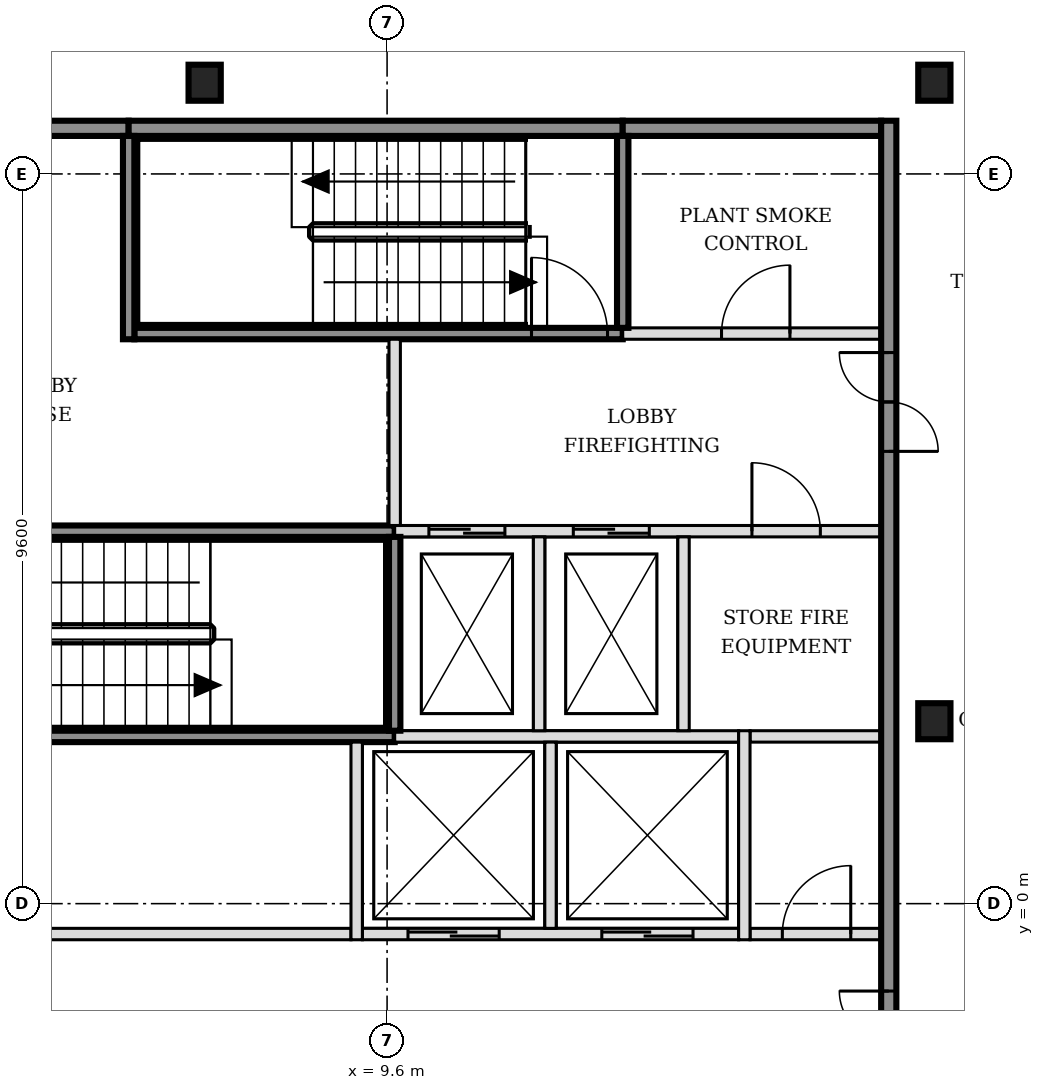
"""IFC4 building model, lengths in metres.
Left out: names, types, materials, properties, quantities, classifications, styles, units other than length and angle.
Written with IfcOpenShell. Run it as: python <this file> out.ifc"""

import sys

from ifc_helpers import new_model, si_unit, direction, frame, frame_2d, origin, origin_2d, place, context, subcontext, project, spatial, rectangle, i_section, extrude, element, fill, save


model = new_model("IFC4")
c1 = context("Model", 3, precision=1e-05, world=origin(), true_north=direction((0.0, 1.0)))
c2 = subcontext(c1, "Body", "Model", "MODEL_VIEW")
j1 = project(units=[si_unit("LENGTHUNIT", "METRE"), si_unit("PLANEANGLEUNIT", "RADIAN")], contexts=[c1])
p1 = place(None, origin())
s1 = spatial("IfcSite", under=j1, at=p1, CompositionType="ELEMENT")
p2 = place(p1, origin())
s2 = spatial("IfcBuilding", under=s1, at=p2, CompositionType="ELEMENT")
p3 = place(p2, frame((0.0, 0.0, 147.0)))
s3 = spatial("IfcBuildingStorey", under=s2, at=p3, CompositionType="ELEMENT", Elevation=147.0)
for number, where, z_axis, x_axis in (
    (1, (16.8, 2.4, -0.15), (0.0, 0.0, 1.0), (1.0, 0.0, 0.0)),
    (2, (7.2, 10.8, -0.15), (0.0, 0.0, 1.0), (1.0, 0.0, 0.0)),
    (3, (16.8, 10.8, -0.15), (0.0, 0.0, 1.0), (1.0, 0.0, 0.0)),
):
    element("IfcColumn", number, at=place(p3, frame(where, z_axis=z_axis, x_axis=x_axis)), inside=s3, PredefinedType="COLUMN", context=c2, shape_type="SweptSolid", body=[
        extrude(i_section(OverallWidth=0.424, OverallDepth=0.474, WebThickness=0.048, FlangeThickness=0.077, FilletRadius=0.015, at=origin_2d()), origin(), (0.0, 0.0, 1.0), 3.6),
    ])
p4 = place(p3, frame((-1.7, -0.4, 0.0), z_axis=(0.0, 0.0, 1.0), x_axis=(1.0, 0.0, 0.0)))
e4 = element("IfcWall", 4, at=p4, inside=s3, PredefinedType="PARTITIONING", context=c2, shape_type="SweptSolid", body=[
    extrude(rectangle(XDim=10.825, YDim=0.15, at=frame_2d((5.413, 0.0))), origin(), (0.0, 0.0, 1.0), 3.45),
])
p5 = place(p4, frame((4.95, 0.0, 0.0)))
e5 = element("IfcOpeningElement", 5, at=p5, cuts=e4, PredefinedType="OPENING", context=c2, shape_type="SweptSolid", body=[
    extrude(rectangle(XDim=0.9, YDim=2.1, at=frame_2d((0.45, 1.05))), frame((0.0, 0.085, 0.0), z_axis=(0.0, -1.0, 0.0), x_axis=(1.0, 0.0, 0.0)), (0.0, 0.0, 1.0), 0.17),
])
p6 = place(p3, frame((9.275, -0.4, 0.0), z_axis=(0.0, 0.0, 1.0), x_axis=(1.0, 0.0, 0.0)))
e6 = element("IfcWall", 6, at=p6, inside=s3, PredefinedType="SOLIDWALL", context=c2, shape_type="SweptSolid", body=[
    extrude(rectangle(XDim=4.95, YDim=0.15, at=frame_2d((2.475, 0.0))), origin(), (0.0, 0.0, 1.0), 3.45),
])
p7 = place(p6, frame((0.6, 0.0, 0.0)))
e7 = element("IfcOpeningElement", 7, at=p7, cuts=e6, PredefinedType="OPENING", context=c2, shape_type="SweptSolid", body=[
    extrude(rectangle(XDim=1.2, YDim=2.1, at=frame_2d((0.6, 1.05))), frame((0.0, 0.085, 0.0), z_axis=(0.0, -1.0, 0.0), x_axis=(1.0, 0.0, 0.0)), (0.0, 0.0, 1.0), 0.17),
])
p8 = place(p6, frame((3.15, 0.0, 0.0)))
e8 = element("IfcOpeningElement", 8, at=p8, cuts=e6, PredefinedType="OPENING", context=c2, shape_type="SweptSolid", body=[
    extrude(rectangle(XDim=1.2, YDim=2.1, at=frame_2d((0.6, 1.05))), frame((0.0, 0.085, 0.0), z_axis=(0.0, -1.0, 0.0), x_axis=(1.0, 0.0, 0.0)), (0.0, 0.0, 1.0), 0.17),
])
p9 = place(p3, frame((14.375, -0.4, 0.0), z_axis=(0.0, 0.0, 1.0), x_axis=(1.0, 0.0, 0.0)))
e9 = element("IfcWall", 9, at=p9, inside=s3, PredefinedType="PARTITIONING", context=c2, shape_type="SweptSolid", body=[
    extrude(rectangle(XDim=1.725, YDim=0.15, at=frame_2d((0.863, 0.0))), origin(), (0.0, 0.0, 1.0), 3.45),
])
p10 = place(p9, frame((0.425, 0.0, 0.0)))
e10 = element("IfcOpeningElement", 10, at=p10, cuts=e9, PredefinedType="OPENING", context=c2, shape_type="SweptSolid", body=[
    extrude(rectangle(XDim=0.9, YDim=2.1, at=frame_2d((0.45, 1.05))), frame((0.0, 0.085, 0.0), z_axis=(0.0, -1.0, 0.0), x_axis=(1.0, 0.0, 0.0)), (0.0, 0.0, 1.0), 0.17),
])
p11 = place(p3, frame((3.2, 2.2, 0.0), z_axis=(0.0, 0.0, 1.0), x_axis=(1.0, 0.0, 0.0)))
e11 = element("IfcWall", 11, at=p11, inside=s3, PredefinedType="SOLIDWALL", context=c2, shape_type="SweptSolid", body=[
    extrude(rectangle(XDim=6.5, YDim=0.15, at=frame_2d((3.25, 0.0))), origin(), (0.0, 0.0, 1.0), 3.45),
])
p12 = place(p3, frame((9.7, 2.2, 0.0), z_axis=(0.0, 0.0, 1.0), x_axis=(1.0, 0.0, 0.0)))
e12 = element("IfcWall", 12, at=p12, inside=s3, PredefinedType="SOLIDWALL", context=c2, shape_type="SweptSolid", body=[
    extrude(rectangle(XDim=4.525, YDim=0.15, at=frame_2d((2.263, 0.0))), origin(), (0.0, 0.0, 1.0), 3.45),
])
p13 = place(p3, frame((14.375, 2.2, 0.0), z_axis=(0.0, 0.0, 1.0), x_axis=(1.0, 0.0, 0.0)))
e13 = element("IfcWall", 13, at=p13, inside=s3, PredefinedType="PARTITIONING", context=c2, shape_type="SweptSolid", body=[
    extrude(rectangle(XDim=1.725, YDim=0.15, at=frame_2d((0.863, 0.0))), origin(), (0.0, 0.0, 1.0), 3.45),
])
p14 = place(p3, frame((3.2, 4.9, 0.0), z_axis=(0.0, 0.0, 1.0), x_axis=(1.0, 0.0, 0.0)))
e14 = element("IfcWall", 14, at=p14, inside=s3, PredefinedType="SOLIDWALL", context=c2, shape_type="SweptSolid", body=[
    extrude(rectangle(XDim=6.5, YDim=0.15, at=frame_2d((3.25, 0.0))), origin(), (0.0, 0.0, 1.0), 3.45),
])
p15 = place(p14, frame((0.175, 0.0, 0.0)))
e15 = element("IfcOpeningElement", 15, at=p15, cuts=e14, PredefinedType="OPENING", context=c2, shape_type="SweptSolid", body=[
    extrude(rectangle(XDim=1.0, YDim=2.1, at=frame_2d((0.5, 1.05))), frame((0.0, 0.085, 0.0), z_axis=(0.0, -1.0, 0.0), x_axis=(1.0, 0.0, 0.0)), (0.0, 0.0, 1.0), 0.17),
])
p16 = place(p3, frame((9.7, 4.9, 0.0), z_axis=(0.0, 0.0, 1.0), x_axis=(1.0, 0.0, 0.0)))
e16 = element("IfcWall", 16, at=p16, inside=s3, PredefinedType="SOLIDWALL", context=c2, shape_type="SweptSolid", body=[
    extrude(rectangle(XDim=6.4, YDim=0.15, at=frame_2d((3.2, 0.0))), origin(), (0.0, 0.0, 1.0), 3.45),
])
p17 = place(p16, frame((0.45, 0.0, 0.0)))
e17 = element("IfcOpeningElement", 17, at=p17, cuts=e16, PredefinedType="OPENING", context=c2, shape_type="SweptSolid", body=[
    extrude(rectangle(XDim=1.0, YDim=2.1, at=frame_2d((0.5, 1.05))), frame((0.0, 0.085, 0.0), z_axis=(0.0, -1.0, 0.0), x_axis=(1.0, 0.0, 0.0)), (0.0, 0.0, 1.0), 0.17),
])
p18 = place(p16, frame((2.35, 0.0, 0.0)))
e18 = element("IfcOpeningElement", 18, at=p18, cuts=e16, PredefinedType="OPENING", context=c2, shape_type="SweptSolid", body=[
    extrude(rectangle(XDim=1.0, YDim=2.1, at=frame_2d((0.5, 1.05))), frame((0.0, 0.085, 0.0), z_axis=(0.0, -1.0, 0.0), x_axis=(1.0, 0.0, 0.0)), (0.0, 0.0, 1.0), 0.17),
])
p19 = place(p16, frame((4.7, 0.0, 0.0)))
e19 = element("IfcOpeningElement", 19, at=p19, cuts=e16, PredefinedType="OPENING", context=c2, shape_type="SweptSolid", body=[
    extrude(rectangle(XDim=0.9, YDim=2.1, at=frame_2d((0.45, 1.05))), frame((0.0, 0.085, 0.0), z_axis=(0.0, -1.0, 0.0), x_axis=(1.0, 0.0, 0.0)), (0.0, 0.0, 1.0), 0.17),
])
p20 = place(p3, frame((6.275, 7.5, 0.0), z_axis=(0.0, 0.0, 1.0), x_axis=(1.0, 0.0, 0.0)))
e20 = element("IfcWall", 20, at=p20, inside=s3, PredefinedType="SOLIDWALL", context=c2, shape_type="SweptSolid", body=[
    extrude(rectangle(XDim=6.425, YDim=0.15, at=frame_2d((3.212, 0.0))), origin(), (0.0, 0.0, 1.0), 3.45),
])
p21 = place(p20, frame((5.225, 0.0, 0.0)))
e21 = element("IfcOpeningElement", 21, at=p21, cuts=e20, PredefinedType="OPENING", context=c2, shape_type="SweptSolid", body=[
    extrude(rectangle(XDim=1.0, YDim=2.1, at=frame_2d((0.5, 1.05))), frame((0.0, 0.085, 0.0), z_axis=(0.0, -1.0, 0.0), x_axis=(1.0, 0.0, 0.0)), (0.0, 0.0, 1.0), 0.17),
])
p22 = place(p3, frame((12.7, 7.5, 0.0), z_axis=(0.0, 0.0, 1.0), x_axis=(1.0, 0.0, 0.0)))
e22 = element("IfcWall", 22, at=p22, inside=s3, PredefinedType="SOLIDWALL", context=c2, shape_type="SweptSolid", body=[
    extrude(rectangle(XDim=3.4, YDim=0.15, at=frame_2d((1.7, 0.0))), origin(), (0.0, 0.0, 1.0), 3.45),
])
p23 = place(p22, frame((1.3, 0.0, 0.0)))
e23 = element("IfcOpeningElement", 23, at=p23, cuts=e22, PredefinedType="OPENING", context=c2, shape_type="SweptSolid", body=[
    extrude(rectangle(XDim=0.9, YDim=2.1, at=frame_2d((0.45, 1.05))), frame((0.0, 0.085, 0.0), z_axis=(0.0, -1.0, 0.0), x_axis=(1.0, 0.0, 0.0)), (0.0, 0.0, 1.0), 0.17),
])
p24 = place(p3, frame((-1.7, 10.2, 0.0), z_axis=(0.0, 0.0, 1.0), x_axis=(1.0, 0.0, 0.0)))
e24 = element("IfcWall", 24, at=p24, inside=s3, PredefinedType="SOLIDWALL", context=c2, shape_type="SweptSolid", body=[
    extrude(rectangle(XDim=7.9, YDim=0.2, at=frame_2d((3.95, 0.0))), origin(), (0.0, 0.0, 1.0), 3.45),
])
p25 = place(p3, frame((6.2, 10.2, 0.0), z_axis=(0.0, 0.0, 1.0), x_axis=(1.0, 0.0, 0.0)))
e25 = element("IfcWall", 25, at=p25, inside=s3, PredefinedType="SOLIDWALL", context=c2, shape_type="SweptSolid", body=[
    extrude(rectangle(XDim=6.5, YDim=0.2, at=frame_2d((3.25, 0.0))), origin(), (0.0, 0.0, 1.0), 3.45),
])
p26 = place(p3, frame((12.7, 10.2, 0.0), z_axis=(0.0, 0.0, 1.0), x_axis=(1.0, 0.0, 0.0)))
e26 = element("IfcWall", 26, at=p26, inside=s3, PredefinedType="SOLIDWALL", context=c2, shape_type="SweptSolid", body=[
    extrude(rectangle(XDim=3.4, YDim=0.2, at=frame_2d((1.7, 0.0))), origin(), (0.0, 0.0, 1.0), 3.45),
])
p27 = place(p3, frame((6.2, 7.425, 0.0), z_axis=(0.0, 0.0, 1.0), x_axis=(0.0, 1.0, 0.0)))
e27 = element("IfcWall", 27, at=p27, inside=s3, PredefinedType="SOLIDWALL", context=c2, shape_type="SweptSolid", body=[
    extrude(rectangle(XDim=2.675, YDim=0.15, at=frame_2d((1.337, 0.0))), origin(), (0.0, 0.0, 1.0), 3.45),
])
p28 = place(p3, frame((9.2, -0.475, 0.0), z_axis=(0.0, 0.0, 1.0), x_axis=(0.0, 1.0, 0.0)))
e28 = element("IfcWall", 28, at=p28, inside=s3, PredefinedType="SOLIDWALL", context=c2, shape_type="SweptSolid", body=[
    extrude(rectangle(XDim=2.6, YDim=0.15, at=frame_2d((1.3, 0.0))), origin(), (0.0, 0.0, 1.0), 3.45),
])
p29 = place(p3, frame((9.7, 2.275, 0.0), z_axis=(0.0, 0.0, 1.0), x_axis=(0.0, 1.0, 0.0)))
e29 = element("IfcWall", 29, at=p29, inside=s3, PredefinedType="SOLIDWALL", context=c2, shape_type="SweptSolid", body=[
    extrude(rectangle(XDim=2.55, YDim=0.15, at=frame_2d((1.275, 0.0))), origin(), (0.0, 0.0, 1.0), 3.45),
])
p30 = place(p3, frame((9.7, 4.975, 0.0), z_axis=(0.0, 0.0, 1.0), x_axis=(0.0, 1.0, 0.0)))
e30 = element("IfcWall", 30, at=p30, inside=s3, PredefinedType="SOLIDWALL", context=c2, shape_type="SweptSolid", body=[
    extrude(rectangle(XDim=2.45, YDim=0.15, at=frame_2d((1.225, 0.0))), origin(), (0.0, 0.0, 1.0), 3.45),
])
p31 = place(p3, frame((11.6, 2.275, 0.0), z_axis=(0.0, 0.0, 1.0), x_axis=(0.0, 1.0, 0.0)))
e31 = element("IfcWall", 31, at=p31, inside=s3, PredefinedType="SOLIDWALL", context=c2, shape_type="SweptSolid", body=[
    extrude(rectangle(XDim=2.55, YDim=0.15, at=frame_2d((1.275, 0.0))), origin(), (0.0, 0.0, 1.0), 3.45),
])
p32 = place(p3, frame((11.75, -0.325, 0.0), z_axis=(0.0, 0.0, 1.0), x_axis=(0.0, 1.0, 0.0)))
e32 = element("IfcWall", 32, at=p32, inside=s3, PredefinedType="SOLIDWALL", context=c2, shape_type="SweptSolid", body=[
    extrude(rectangle(XDim=2.45, YDim=0.15, at=frame_2d((1.225, 0.0))), origin(), (0.0, 0.0, 1.0), 3.45),
])
p33 = place(p3, frame((12.7, 7.575, 0.0), z_axis=(0.0, 0.0, 1.0), x_axis=(0.0, 1.0, 0.0)))
e33 = element("IfcWall", 33, at=p33, inside=s3, PredefinedType="SOLIDWALL", context=c2, shape_type="SweptSolid", body=[
    extrude(rectangle(XDim=2.525, YDim=0.15, at=frame_2d((1.263, 0.0))), origin(), (0.0, 0.0, 1.0), 3.45),
])
p34 = place(p3, frame((13.5, 2.275, 0.0), z_axis=(0.0, 0.0, 1.0), x_axis=(0.0, 1.0, 0.0)))
e34 = element("IfcWall", 34, at=p34, inside=s3, PredefinedType="SOLIDWALL", context=c2, shape_type="SweptSolid", body=[
    extrude(rectangle(XDim=2.55, YDim=0.15, at=frame_2d((1.275, 0.0))), origin(), (0.0, 0.0, 1.0), 3.45),
])
p35 = place(p3, frame((14.3, -0.475, 0.0), z_axis=(0.0, 0.0, 1.0), x_axis=(0.0, 1.0, 0.0)))
e35 = element("IfcWall", 35, at=p35, inside=s3, PredefinedType="SOLIDWALL", context=c2, shape_type="SweptSolid", body=[
    extrude(rectangle(XDim=2.75, YDim=0.15, at=frame_2d((1.375, 0.0))), origin(), (0.0, 0.0, 1.0), 3.45),
])
p36 = place(p3, frame((16.2, -5.5, 0.0), z_axis=(0.0, 0.0, 1.0), x_axis=(0.0, 1.0, 0.0)))
e36 = element("IfcWall", 36, at=p36, inside=s3, PredefinedType="SOLIDWALL", context=c2, shape_type="SweptSolid", body=[
    extrude(rectangle(XDim=15.8, YDim=0.2, at=frame_2d((7.9, 0.0))), origin(), (0.0, 0.0, 1.0), 3.45),
])
p37 = place(p36, frame((3.05, 0.0, 0.0)))
e37 = element("IfcOpeningElement", 37, at=p37, cuts=e36, PredefinedType="OPENING", context=c2, shape_type="SweptSolid", body=[
    extrude(rectangle(XDim=1.3, YDim=2.1, at=frame_2d((0.65, 1.05))), frame((0.0, 0.11, 0.0), z_axis=(0.0, -1.0, 0.0), x_axis=(1.0, 0.0, 0.0)), (0.0, 0.0, 1.0), 0.22),
])
p38 = place(p36, frame((11.45, 0.0, 0.0)))
e38 = element("IfcOpeningElement", 38, at=p38, cuts=e36, PredefinedType="OPENING", context=c2, shape_type="SweptSolid", body=[
    extrude(rectangle(XDim=1.3, YDim=2.1, at=frame_2d((0.65, 1.05))), frame((0.0, 0.11, 0.0), z_axis=(0.0, -1.0, 0.0), x_axis=(1.0, 0.0, 0.0)), (0.0, 0.0, 1.0), 0.22),
])
p39 = place(p3, frame((26.272, 9.522, 0.0), z_axis=(0.0, 0.0, 1.0), x_axis=(-0.707097742657, 0.707115819601, 0.0)))
e39 = element("IfcWall", 39, at=p39, inside=s3, PredefinedType="PARTITIONING", context=c2, shape_type="SweptSolid", body=[
    extrude(rectangle(XDim=13.506, YDim=0.15, at=frame_2d((6.753, 0.0))), origin(), (0.0, 0.0, 1.0), 2.73),
])
p40 = place(p39, frame((1.398, 0.0, 0.0)))
e40 = element("IfcOpeningElement", 40, at=p40, cuts=e39, PredefinedType="OPENING", context=c2, shape_type="SweptSolid", body=[
    extrude(rectangle(XDim=0.9, YDim=2.1, at=frame_2d((0.45, 1.05))), frame((0.0, 0.085, 0.0), z_axis=(0.0, -1.0, 0.0), x_axis=(1.0, 0.0, 0.0)), (0.0, 0.0, 1.0), 0.17),
])
p41 = place(p39, frame((4.668, 0.0, 0.0)))
e41 = element("IfcOpeningElement", 41, at=p41, cuts=e39, PredefinedType="OPENING", context=c2, shape_type="SweptSolid", body=[
    extrude(rectangle(XDim=0.9, YDim=2.1, at=frame_2d((0.45, 1.05))), frame((0.0, 0.085, 0.0), z_axis=(0.0, -1.0, 0.0), x_axis=(1.0, 0.0, 0.0)), (0.0, 0.0, 1.0), 0.17),
])
p42 = place(p39, frame((7.938, 0.0, 0.0)))
e42 = element("IfcOpeningElement", 42, at=p42, cuts=e39, PredefinedType="OPENING", context=c2, shape_type="SweptSolid", body=[
    extrude(rectangle(XDim=0.9, YDim=2.1, at=frame_2d((0.45, 1.05))), frame((0.0, 0.085, 0.0), z_axis=(0.0, -1.0, 0.0), x_axis=(1.0, 0.0, 0.0)), (0.0, 0.0, 1.0), 0.17),
])
p43 = place(p39, frame((11.405, 0.0, 0.0)))
e43 = element("IfcOpeningElement", 43, at=p43, cuts=e39, PredefinedType="OPENING", context=c2, shape_type="SweptSolid", body=[
    extrude(rectangle(XDim=0.9, YDim=2.1, at=frame_2d((0.45, 1.05))), frame((0.0, 0.085, 0.0), z_axis=(0.0, -1.0, 0.0), x_axis=(1.0, 0.0, 0.0)), (0.0, 0.0, 1.0), 0.17),
])
p44 = place(p7, origin())
e44 = element("IfcDoor", 44, at=p44, inside=s3, OperationType="DOUBLE_DOOR_SLIDING", PredefinedType="DOOR", context=c2, shape_type="SweptSolid", body=[
    extrude(rectangle(XDim=1.2, YDim=2.1, at=frame_2d((0.6, 1.05))), frame((0.0, 0.025, 0.0), z_axis=(0.0, -1.0, 0.0), x_axis=(1.0, 0.0, 0.0)), (0.0, 0.0, 1.0), 0.05),
])
fill(e7, e44)
p45 = place(p8, origin())
e45 = element("IfcDoor", 45, at=p45, inside=s3, OperationType="DOUBLE_DOOR_SLIDING", PredefinedType="DOOR", context=c2, shape_type="SweptSolid", body=[
    extrude(rectangle(XDim=1.2, YDim=2.1, at=frame_2d((0.6, 1.05))), frame((0.0, 0.025, 0.0), z_axis=(0.0, -1.0, 0.0), x_axis=(1.0, 0.0, 0.0)), (0.0, 0.0, 1.0), 0.05),
])
fill(e8, e45)
p46 = place(p17, origin())
e46 = element("IfcDoor", 46, at=p46, inside=s3, OperationType="DOUBLE_DOOR_SLIDING", PredefinedType="DOOR", context=c2, shape_type="SweptSolid", body=[
    extrude(rectangle(XDim=1.0, YDim=2.1, at=frame_2d((0.5, 1.05))), frame((0.0, 0.025, 0.0), z_axis=(0.0, -1.0, 0.0), x_axis=(1.0, 0.0, 0.0)), (0.0, 0.0, 1.0), 0.05),
])
fill(e17, e46)
p47 = place(p18, origin())
e47 = element("IfcDoor", 47, at=p47, inside=s3, OperationType="DOUBLE_DOOR_SLIDING", PredefinedType="DOOR", context=c2, shape_type="SweptSolid", body=[
    extrude(rectangle(XDim=1.0, YDim=2.1, at=frame_2d((0.5, 1.05))), frame((0.0, 0.025, 0.0), z_axis=(0.0, -1.0, 0.0), x_axis=(1.0, 0.0, 0.0)), (0.0, 0.0, 1.0), 0.05),
])
fill(e18, e47)
p48 = place(p21, origin())
e48 = element("IfcDoor", 48, at=p48, inside=s3, OperationType="SINGLE_SWING_LEFT", PredefinedType="DOOR", context=c2, shape_type="SweptSolid", body=[
    extrude(rectangle(XDim=1.0, YDim=2.1, at=frame_2d((0.5, 1.05))), frame((0.0, 0.025, 0.0), z_axis=(0.0, -1.0, 0.0), x_axis=(1.0, 0.0, 0.0)), (0.0, 0.0, 1.0), 0.05),
])
fill(e21, e48)
p49 = place(p37, origin())
e49 = element("IfcDoor", 49, at=p49, inside=s3, OperationType="DOUBLE_DOOR_SINGLE_SWING", PredefinedType="DOOR", context=c2, shape_type="SweptSolid", body=[
    extrude(rectangle(XDim=1.3, YDim=2.1, at=frame_2d((0.65, 1.05))), frame((0.0, 0.025, 0.0), z_axis=(0.0, -1.0, 0.0), x_axis=(1.0, 0.0, 0.0)), (0.0, 0.0, 1.0), 0.05),
])
fill(e37, e49)
p50 = place(p38, origin())
e50 = element("IfcDoor", 50, at=p50, inside=s3, OperationType="DOUBLE_DOOR_SINGLE_SWING", PredefinedType="DOOR", context=c2, shape_type="SweptSolid", body=[
    extrude(rectangle(XDim=1.3, YDim=2.1, at=frame_2d((0.65, 1.05))), frame((0.0, 0.025, 0.0), z_axis=(0.0, -1.0, 0.0), x_axis=(1.0, 0.0, 0.0)), (0.0, 0.0, 1.0), 0.05),
])
fill(e38, e50)
p51 = place(p10, origin())
e51 = element("IfcDoor", 51, at=p51, inside=s3, OperationType="SINGLE_SWING_RIGHT", PredefinedType="DOOR", context=c2, shape_type="SweptSolid", body=[
    extrude(rectangle(XDim=0.9, YDim=2.1, at=frame_2d((0.45, 1.05))), frame((0.0, 0.025, 0.0), z_axis=(0.0, -1.0, 0.0), x_axis=(1.0, 0.0, 0.0)), (0.0, 0.0, 1.0), 0.05),
])
fill(e10, e51)
p52 = place(p19, origin())
e52 = element("IfcDoor", 52, at=p52, inside=s3, OperationType="SINGLE_SWING_LEFT", PredefinedType="DOOR", context=c2, shape_type="SweptSolid", body=[
    extrude(rectangle(XDim=0.9, YDim=2.1, at=frame_2d((0.45, 1.05))), frame((0.0, 0.025, 0.0), z_axis=(0.0, -1.0, 0.0), x_axis=(1.0, 0.0, 0.0)), (0.0, 0.0, 1.0), 0.05),
])
fill(e19, e52)
p53 = place(p23, origin())
e53 = element("IfcDoor", 53, at=p53, inside=s3, OperationType="SINGLE_SWING_RIGHT", PredefinedType="DOOR", context=c2, shape_type="SweptSolid", body=[
    extrude(rectangle(XDim=0.9, YDim=2.1, at=frame_2d((0.45, 1.05))), frame((0.0, 0.025, 0.0), z_axis=(0.0, -1.0, 0.0), x_axis=(1.0, 0.0, 0.0)), (0.0, 0.0, 1.0), 0.05),
])
fill(e23, e53)
save(model, sys.argv[1])
